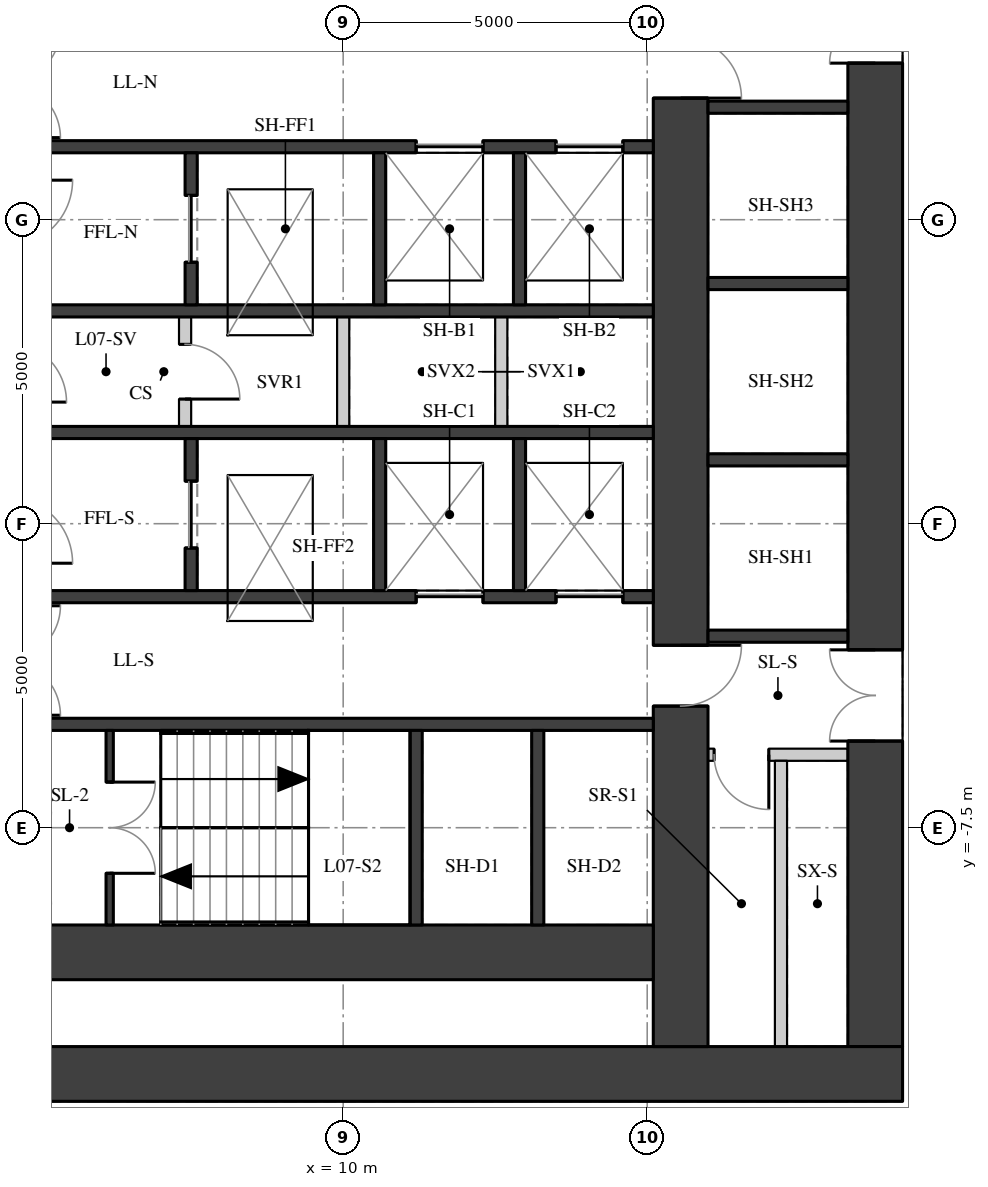
"""IFC4 building model, lengths in metres.
Left out: names, types, materials, properties, quantities, classifications, styles, units other than length and angle.
Written with IfcOpenShell. Run it as: python <this file> out.ifc"""

import sys

from ifc_helpers import new_model, si_unit, direction, frame, frame_2d, origin, place, context, subcontext, project, spatial, rectangle, extrude, element, fill, save


model = new_model("IFC4")
c1 = context("Model", 3, precision=1e-05, world=origin(), true_north=direction((0.0, 1.0)))
c2 = subcontext(c1, "Body", "Model", "MODEL_VIEW")
j1 = project(units=[si_unit("LENGTHUNIT", "METRE"), si_unit("PLANEANGLEUNIT", "RADIAN")], contexts=[c1])
p1 = place(None, origin())
s1 = spatial("IfcSite", under=j1, at=p1, CompositionType="ELEMENT")
p2 = place(p1, origin())
s2 = spatial("IfcBuilding", under=s1, at=p2, CompositionType="ELEMENT")
p3 = place(p2, frame((0.0, 0.0, 31.6)))
s3 = spatial("IfcBuildingStorey", under=s2, at=p3, CompositionType="ELEMENT", Elevation=31.6)
p4 = place(p3, frame((18.75, -11.1, 0.0), z_axis=(0.0, 0.0, 1.0), x_axis=(0.0, 1.0, 0.0)))
e1 = element("IfcWall", 1, at=p4, inside=s3, PredefinedType="SHEAR", context=c2, shape_type="SweptSolid", body=[
    extrude(rectangle(XDim=22.2, YDim=0.9, at=frame_2d((11.1, 0.0))), origin(), (0.0, 0.0, 1.0), 3.02),
])
p5 = place(p4, frame((16.175, 0.0, 0.0)))
e2 = element("IfcOpeningElement", 2, at=p5, cuts=e1, PredefinedType="OPENING", context=c2, shape_type="SweptSolid", body=[
    extrude(rectangle(XDim=1.5, YDim=2.1, at=frame_2d((0.75, 1.05))), frame((0.0, 0.46, 0.0), z_axis=(0.0, -1.0, 0.0), x_axis=(1.0, 0.0, 0.0)), (0.0, 0.0, 1.0), 0.92),
])
p6 = place(p4, frame((5.025, 0.0, 0.0)))
e3 = element("IfcOpeningElement", 3, at=p6, cuts=e1, PredefinedType="OPENING", context=c2, shape_type="SweptSolid", body=[
    extrude(rectangle(XDim=1.5, YDim=2.1, at=frame_2d((0.75, 1.05))), frame((0.0, 0.46, 0.0), z_axis=(0.0, -1.0, 0.0), x_axis=(1.0, 0.0, 0.0)), (0.0, 0.0, 1.0), 0.92),
])
p7 = place(p3, frame((4.0, -11.55, 0.0), z_axis=(0.0, 0.0, 1.0), x_axis=(1.0, 0.0, 0.0)))
e4 = element("IfcWall", 4, at=p7, inside=s3, PredefinedType="SHEAR", context=c2, shape_type="SweptSolid", body=[
    extrude(rectangle(XDim=15.2, YDim=0.9, at=frame_2d((7.6, 0.0))), origin(), (0.0, 0.0, 1.0), 3.02),
])
p8 = place(p3, frame((15.55, -11.1, 0.0), z_axis=(0.0, 0.0, 1.0), x_axis=(0.0, 1.0, 0.0)))
e5 = element("IfcWall", 5, at=p8, inside=s3, PredefinedType="SHEAR", context=c2, shape_type="SweptSolid", body=[
    extrude(rectangle(XDim=22.2, YDim=0.9, at=frame_2d((11.1, 0.0))), origin(), (0.0, 0.0, 1.0), 3.02),
])
p9 = place(p8, frame((15.6, 0.0, 0.0)))
e6 = element("IfcOpeningElement", 6, at=p9, cuts=e5, PredefinedType="OPENING", context=c2, shape_type="SweptSolid", body=[
    extrude(rectangle(XDim=1.0, YDim=2.1, at=frame_2d((0.5, 1.05))), frame((0.0, 0.46, 0.0), z_axis=(0.0, -1.0, 0.0), x_axis=(1.0, 0.0, 0.0)), (0.0, 0.0, 1.0), 0.92),
])
p10 = place(p8, frame((5.6, 0.0, 0.0)))
e7 = element("IfcOpeningElement", 7, at=p10, cuts=e5, PredefinedType="OPENING", context=c2, shape_type="SweptSolid", body=[
    extrude(rectangle(XDim=1.0, YDim=2.1, at=frame_2d((0.5, 1.05))), frame((0.0, 0.46, 0.0), z_axis=(0.0, -1.0, 0.0), x_axis=(1.0, 0.0, 0.0)), (0.0, 0.0, 1.0), 0.92),
])
p11 = place(p3, frame((4.9, -9.55, 0.0), z_axis=(0.0, 0.0, 1.0), x_axis=(1.0, 0.0, 0.0)))
e8 = element("IfcWall", 8, at=p11, inside=s3, PredefinedType="SHEAR", context=c2, shape_type="SweptSolid", body=[
    extrude(rectangle(XDim=10.2, YDim=0.9, at=frame_2d((5.1, 0.0))), origin(), (0.0, 0.0, 1.0), 3.02),
])
p12 = place(p3, frame((4.9, 3.7, 0.0), z_axis=(0.0, 0.0, 1.0), x_axis=(1.0, 0.0, 0.0)))
e9 = element("IfcWall", 9, at=p12, inside=s3, PredefinedType="SHEAR", context=c2, shape_type="SweptSolid", body=[
    extrude(rectangle(XDim=10.2, YDim=0.2, at=frame_2d((5.1, 0.0))), origin(), (0.0, 0.0, 1.0), 3.02),
])
p13 = place(p12, frame((6.3, 0.0, 0.0)))
e10 = element("IfcOpeningElement", 10, at=p13, cuts=e9, PredefinedType="OPENING", context=c2, shape_type="SweptSolid", body=[
    extrude(rectangle(XDim=1.1, YDim=2.1, at=frame_2d((0.55, 1.05))), frame((0.0, 0.11, 0.0), z_axis=(0.0, -1.0, 0.0), x_axis=(1.0, 0.0, 0.0)), (0.0, 0.0, 1.0), 0.22),
])
p14 = place(p12, frame((8.6, 0.0, 0.0)))
e11 = element("IfcOpeningElement", 11, at=p14, cuts=e9, PredefinedType="OPENING", context=c2, shape_type="SweptSolid", body=[
    extrude(rectangle(XDim=1.1, YDim=2.1, at=frame_2d((0.55, 1.05))), frame((0.0, 0.11, 0.0), z_axis=(0.0, -1.0, 0.0), x_axis=(1.0, 0.0, 0.0)), (0.0, 0.0, 1.0), 0.22),
])
for number, where, z_axis, x_axis in (
    (12, (4.9, 1.0, 0.0), (0.0, 0.0, 1.0), (1.0, 0.0, 0.0)),
    (13, (4.9, -1.0, 0.0), (0.0, 0.0, 1.0), (1.0, 0.0, 0.0)),
):
    element("IfcWall", number, at=place(p3, frame(where, z_axis=z_axis, x_axis=x_axis)), inside=s3, PredefinedType="SHEAR", context=c2, shape_type="SweptSolid", body=[
        extrude(rectangle(XDim=10.2, YDim=0.2, at=frame_2d((5.1, 0.0))), origin(), (0.0, 0.0, 1.0), 3.02),
    ])
p15 = place(p3, frame((4.9, -3.7, 0.0), z_axis=(0.0, 0.0, 1.0), x_axis=(1.0, 0.0, 0.0)))
e14 = element("IfcWall", 14, at=p15, inside=s3, PredefinedType="SHEAR", context=c2, shape_type="SweptSolid", body=[
    extrude(rectangle(XDim=10.2, YDim=0.2, at=frame_2d((5.1, 0.0))), origin(), (0.0, 0.0, 1.0), 3.02),
])
p16 = place(p15, frame((6.3, 0.0, 0.0)))
e15 = element("IfcOpeningElement", 15, at=p16, cuts=e14, PredefinedType="OPENING", context=c2, shape_type="SweptSolid", body=[
    extrude(rectangle(XDim=1.1, YDim=2.1, at=frame_2d((0.55, 1.05))), frame((0.0, 0.11, 0.0), z_axis=(0.0, -1.0, 0.0), x_axis=(1.0, 0.0, 0.0)), (0.0, 0.0, 1.0), 0.22),
])
p17 = place(p15, frame((8.6, 0.0, 0.0)))
e16 = element("IfcOpeningElement", 16, at=p17, cuts=e14, PredefinedType="OPENING", context=c2, shape_type="SweptSolid", body=[
    extrude(rectangle(XDim=1.1, YDim=2.1, at=frame_2d((0.55, 1.05))), frame((0.0, 0.11, 0.0), z_axis=(0.0, -1.0, 0.0), x_axis=(1.0, 0.0, 0.0)), (0.0, 0.0, 1.0), 0.22),
])
p18 = place(p3, frame((4.9, -5.8, 0.0), z_axis=(0.0, 0.0, 1.0), x_axis=(1.0, 0.0, 0.0)))
e17 = element("IfcWall", 17, at=p18, inside=s3, PredefinedType="SHEAR", context=c2, shape_type="SweptSolid", body=[
    extrude(rectangle(XDim=10.2, YDim=0.2, at=frame_2d((5.1, 0.0))), origin(), (0.0, 0.0, 1.0), 3.02),
])
for number, where, z_axis, x_axis in (
    (18, (11.2, -9.1, 0.0), (0.0, 0.0, 1.0), (0.0, 1.0, 0.0)),
    (19, (13.2, -9.1, 0.0), (0.0, 0.0, 1.0), (0.0, 1.0, 0.0)),
):
    element("IfcWall", number, at=place(p3, frame(where, z_axis=z_axis, x_axis=x_axis)), inside=s3, PredefinedType="SHEAR", context=c2, shape_type="SweptSolid", body=[
        extrude(rectangle(XDim=3.2, YDim=0.2, at=frame_2d((1.6, 0.0))), origin(), (0.0, 0.0, 1.0), 3.02),
    ])
p19 = place(p3, frame((7.5, 1.1, 0.0), z_axis=(0.0, 0.0, 1.0), x_axis=(0.0, 1.0, 0.0)))
e20 = element("IfcWall", 20, at=p19, inside=s3, PredefinedType="SHEAR", context=c2, shape_type="SweptSolid", body=[
    extrude(rectangle(XDim=2.5, YDim=0.2, at=frame_2d((1.25, 0.0))), origin(), (0.0, 0.0, 1.0), 3.02),
])
p20 = place(p19, frame((0.7, 0.0, 0.0)))
e21 = element("IfcOpeningElement", 21, at=p20, cuts=e20, PredefinedType="OPENING", context=c2, shape_type="SweptSolid", body=[
    extrude(rectangle(XDim=1.1, YDim=2.1, at=frame_2d((0.55, 1.05))), frame((0.0, 0.11, 0.0), z_axis=(0.0, -1.0, 0.0), x_axis=(1.0, 0.0, 0.0)), (0.0, 0.0, 1.0), 0.22),
])
p21 = place(p3, frame((7.5, -3.6, 0.0), z_axis=(0.0, 0.0, 1.0), x_axis=(0.0, 1.0, 0.0)))
e22 = element("IfcWall", 22, at=p21, inside=s3, PredefinedType="SHEAR", context=c2, shape_type="SweptSolid", body=[
    extrude(rectangle(XDim=2.5, YDim=0.2, at=frame_2d((1.25, 0.0))), origin(), (0.0, 0.0, 1.0), 3.02),
])
p22 = place(p21, frame((0.7, 0.0, 0.0)))
e23 = element("IfcOpeningElement", 23, at=p22, cuts=e22, PredefinedType="OPENING", context=c2, shape_type="SweptSolid", body=[
    extrude(rectangle(XDim=1.1, YDim=2.1, at=frame_2d((0.55, 1.05))), frame((0.0, 0.11, 0.0), z_axis=(0.0, -1.0, 0.0), x_axis=(1.0, 0.0, 0.0)), (0.0, 0.0, 1.0), 0.22),
])
for number, where, z_axis, x_axis in (
    (24, (10.6, 1.1, 0.0), (0.0, 0.0, 1.0), (0.0, 1.0, 0.0)),
    (25, (10.6, -3.6, 0.0), (0.0, 0.0, 1.0), (0.0, 1.0, 0.0)),
    (26, (12.9, 1.1, 0.0), (0.0, 0.0, 1.0), (0.0, 1.0, 0.0)),
    (27, (12.9, -3.6, 0.0), (0.0, 0.0, 1.0), (0.0, 1.0, 0.0)),
):
    element("IfcWall", number, at=place(p3, frame(where, z_axis=z_axis, x_axis=x_axis)), inside=s3, PredefinedType="SHEAR", context=c2, shape_type="SweptSolid", body=[
        extrude(rectangle(XDim=2.5, YDim=0.2, at=frame_2d((1.25, 0.0))), origin(), (0.0, 0.0, 1.0), 3.02),
    ])
p23 = place(p3, frame((6.16, -9.1, 0.0), z_axis=(0.0, 0.0, 1.0), x_axis=(0.0, 1.0, 0.0)))
e28 = element("IfcWall", 28, at=p23, inside=s3, PredefinedType="SHEAR", context=c2, shape_type="SweptSolid", body=[
    extrude(rectangle(XDim=3.2, YDim=0.12, at=frame_2d((1.6, 0.0))), origin(), (0.0, 0.0, 1.0), 3.02),
])
p24 = place(p23, frame((0.85, 0.0, 0.0)))
e29 = element("IfcOpeningElement", 29, at=p24, cuts=e28, PredefinedType="OPENING", context=c2, shape_type="SweptSolid", body=[
    extrude(rectangle(XDim=1.5, YDim=2.1, at=frame_2d((0.75, 1.05))), frame((0.0, 0.07, 0.0), z_axis=(0.0, -1.0, 0.0), x_axis=(1.0, 0.0, 0.0)), (0.0, 0.0, 1.0), 0.14),
])
p25 = place(p3, frame((7.4, -0.9, 0.0), z_axis=(0.0, 0.0, 1.0), x_axis=(0.0, 1.0, 0.0)))
e30 = element("IfcWall", 30, at=p25, inside=s3, PredefinedType="PARTITIONING", context=c2, shape_type="SweptSolid", body=[
    extrude(rectangle(XDim=1.8, YDim=0.2, at=frame_2d((0.9, 0.0))), origin(), (0.0, 0.0, 1.0), 3.02),
])
p26 = place(p25, frame((0.45, 0.0, 0.0)))
e31 = element("IfcOpeningElement", 31, at=p26, cuts=e30, PredefinedType="OPENING", context=c2, shape_type="SweptSolid", body=[
    extrude(rectangle(XDim=0.9, YDim=2.1, at=frame_2d((0.45, 1.05))), frame((0.0, 0.11, 0.0), z_axis=(0.0, -1.0, 0.0), x_axis=(1.0, 0.0, 0.0)), (0.0, 0.0, 1.0), 0.22),
])
for number, where, z_axis, x_axis in (
    (32, (10.0, -0.9, 0.0), (0.0, 0.0, 1.0), (0.0, 1.0, 0.0)),
    (33, (12.6, -0.9, 0.0), (0.0, 0.0, 1.0), (0.0, 1.0, 0.0)),
):
    element("IfcWall", number, at=place(p3, frame(where, z_axis=z_axis, x_axis=x_axis)), inside=s3, PredefinedType="PARTITIONING", context=c2, shape_type="SweptSolid", body=[
        extrude(rectangle(XDim=1.8, YDim=0.2, at=frame_2d((0.9, 0.0))), origin(), (0.0, 0.0, 1.0), 3.02),
    ])
for number, where, z_axis, x_axis in (
    (34, (16.0, -4.35, 0.0), (0.0, 0.0, 1.0), (1.0, 0.0, 0.0)),
    (35, (16.0, -1.45, 0.0), (0.0, 0.0, 1.0), (1.0, 0.0, 0.0)),
    (36, (16.0, 1.45, 0.0), (0.0, 0.0, 1.0), (1.0, 0.0, 0.0)),
    (37, (16.0, 4.35, 0.0), (0.0, 0.0, 1.0), (1.0, 0.0, 0.0)),
):
    element("IfcWall", number, at=place(p3, frame(where, z_axis=z_axis, x_axis=x_axis)), inside=s3, PredefinedType="SHEAR", context=c2, shape_type="SweptSolid", body=[
        extrude(rectangle(XDim=2.3, YDim=0.2, at=frame_2d((1.15, 0.0))), origin(), (0.0, 0.0, 1.0), 3.02),
    ])
p27 = place(p3, frame((16.0, -6.3, 0.0), z_axis=(0.0, 0.0, 1.0), x_axis=(1.0, 0.0, 0.0)))
e38 = element("IfcWall", 38, at=p27, inside=s3, PredefinedType="PARTITIONING", context=c2, shape_type="SweptSolid", body=[
    extrude(rectangle(XDim=2.3, YDim=0.2, at=frame_2d((1.15, 0.0))), origin(), (0.0, 0.0, 1.0), 3.02),
])
p28 = place(p27, frame((0.1, 0.0, 0.0)))
e39 = element("IfcOpeningElement", 39, at=p28, cuts=e38, PredefinedType="OPENING", context=c2, shape_type="SweptSolid", body=[
    extrude(rectangle(XDim=0.9, YDim=2.1, at=frame_2d((0.45, 1.05))), frame((0.0, 0.11, 0.0), z_axis=(0.0, -1.0, 0.0), x_axis=(1.0, 0.0, 0.0)), (0.0, 0.0, 1.0), 0.22),
])
p29 = place(p3, frame((17.2, -11.1, 0.0), z_axis=(0.0, 0.0, 1.0), x_axis=(0.0, 1.0, 0.0)))
e40 = element("IfcWall", 40, at=p29, inside=s3, PredefinedType="PARTITIONING", context=c2, shape_type="SweptSolid", body=[
    extrude(rectangle(XDim=4.7, YDim=0.2, at=frame_2d((2.35, 0.0))), origin(), (0.0, 0.0, 1.0), 3.02),
])
p30 = place(p5, origin())
e41 = element("IfcDoor", 41, at=p30, inside=s3, OperationType="DOUBLE_DOOR_SINGLE_SWING", PredefinedType="DOOR", context=c2, shape_type="SweptSolid", body=[
    extrude(rectangle(XDim=1.5, YDim=2.1, at=frame_2d((0.75, 1.05))), frame((0.0, 0.025, 0.0), z_axis=(0.0, -1.0, 0.0), x_axis=(1.0, 0.0, 0.0)), (0.0, 0.0, 1.0), 0.05),
])
fill(e2, e41)
p31 = place(p6, origin())
e42 = element("IfcDoor", 42, at=p31, inside=s3, OperationType="DOUBLE_DOOR_SINGLE_SWING", PredefinedType="DOOR", context=c2, shape_type="SweptSolid", body=[
    extrude(rectangle(XDim=1.5, YDim=2.1, at=frame_2d((0.75, 1.05))), frame((0.0, 0.025, 0.0), z_axis=(0.0, -1.0, 0.0), x_axis=(1.0, 0.0, 0.0)), (0.0, 0.0, 1.0), 0.05),
])
fill(e3, e42)
p32 = place(p24, origin())
e43 = element("IfcDoor", 43, at=p32, inside=s3, OperationType="DOUBLE_DOOR_SINGLE_SWING", PredefinedType="DOOR", context=c2, shape_type="SweptSolid", body=[
    extrude(rectangle(XDim=1.5, YDim=2.1, at=frame_2d((0.75, 1.05))), frame((0.0, 0.025, 0.0), z_axis=(0.0, -1.0, 0.0), x_axis=(1.0, 0.0, 0.0)), (0.0, 0.0, 1.0), 0.05),
])
fill(e29, e43)
p33 = place(p13, origin())
e44 = element("IfcDoor", 44, at=p33, inside=s3, OperationType="DOUBLE_DOOR_SLIDING", PredefinedType="DOOR", context=c2, shape_type="SweptSolid", body=[
    extrude(rectangle(XDim=1.1, YDim=2.1, at=frame_2d((0.55, 1.05))), frame((0.0, 0.025, 0.0), z_axis=(0.0, -1.0, 0.0), x_axis=(1.0, 0.0, 0.0)), (0.0, 0.0, 1.0), 0.05),
])
fill(e10, e44)
p34 = place(p14, origin())
e45 = element("IfcDoor", 45, at=p34, inside=s3, OperationType="DOUBLE_DOOR_SLIDING", PredefinedType="DOOR", context=c2, shape_type="SweptSolid", body=[
    extrude(rectangle(XDim=1.1, YDim=2.1, at=frame_2d((0.55, 1.05))), frame((0.0, 0.025, 0.0), z_axis=(0.0, -1.0, 0.0), x_axis=(1.0, 0.0, 0.0)), (0.0, 0.0, 1.0), 0.05),
])
fill(e11, e45)
p35 = place(p16, origin())
e46 = element("IfcDoor", 46, at=p35, inside=s3, OperationType="DOUBLE_DOOR_SLIDING", PredefinedType="DOOR", context=c2, shape_type="SweptSolid", body=[
    extrude(rectangle(XDim=1.1, YDim=2.1, at=frame_2d((0.55, 1.05))), frame((0.0, 0.025, 0.0), z_axis=(0.0, -1.0, 0.0), x_axis=(1.0, 0.0, 0.0)), (0.0, 0.0, 1.0), 0.05),
])
fill(e15, e46)
p36 = place(p17, origin())
e47 = element("IfcDoor", 47, at=p36, inside=s3, OperationType="DOUBLE_DOOR_SLIDING", PredefinedType="DOOR", context=c2, shape_type="SweptSolid", body=[
    extrude(rectangle(XDim=1.1, YDim=2.1, at=frame_2d((0.55, 1.05))), frame((0.0, 0.025, 0.0), z_axis=(0.0, -1.0, 0.0), x_axis=(1.0, 0.0, 0.0)), (0.0, 0.0, 1.0), 0.05),
])
fill(e16, e47)
p37 = place(p20, origin())
e48 = element("IfcDoor", 48, at=p37, inside=s3, OperationType="DOUBLE_DOOR_SLIDING", PredefinedType="DOOR", context=c2, shape_type="SweptSolid", body=[
    extrude(rectangle(XDim=1.1, YDim=2.1, at=frame_2d((0.55, 1.05))), frame((0.0, 0.025, 0.0), z_axis=(0.0, -1.0, 0.0), x_axis=(1.0, 0.0, 0.0)), (0.0, 0.0, 1.0), 0.05),
])
fill(e21, e48)
p38 = place(p22, origin())
e49 = element("IfcDoor", 49, at=p38, inside=s3, OperationType="DOUBLE_DOOR_SLIDING", PredefinedType="DOOR", context=c2, shape_type="SweptSolid", body=[
    extrude(rectangle(XDim=1.1, YDim=2.1, at=frame_2d((0.55, 1.05))), frame((0.0, 0.025, 0.0), z_axis=(0.0, -1.0, 0.0), x_axis=(1.0, 0.0, 0.0)), (0.0, 0.0, 1.0), 0.05),
])
fill(e23, e49)
p39 = place(p26, origin())
e50 = element("IfcDoor", 50, at=p39, inside=s3, OperationType="SINGLE_SWING_RIGHT", PredefinedType="DOOR", context=c2, shape_type="SweptSolid", body=[
    extrude(rectangle(XDim=0.9, YDim=2.1, at=frame_2d((0.45, 1.05))), frame((0.0, 0.025, 0.0), z_axis=(0.0, -1.0, 0.0), x_axis=(1.0, 0.0, 0.0)), (0.0, 0.0, 1.0), 0.05),
])
fill(e31, e50)
p40 = place(p9, origin())
e51 = element("IfcDoor", 51, at=p40, inside=s3, OperationType="SINGLE_SWING_RIGHT", PredefinedType="DOOR", context=c2, shape_type="SweptSolid", body=[
    extrude(rectangle(XDim=1.0, YDim=2.1, at=frame_2d((0.5, 1.05))), frame((0.0, 0.025, 0.0), z_axis=(0.0, -1.0, 0.0), x_axis=(1.0, 0.0, 0.0)), (0.0, 0.0, 1.0), 0.05),
])
fill(e6, e51)
p41 = place(p10, origin())
e52 = element("IfcDoor", 52, at=p41, inside=s3, OperationType="SINGLE_SWING_LEFT", PredefinedType="DOOR", context=c2, shape_type="SweptSolid", body=[
    extrude(rectangle(XDim=1.0, YDim=2.1, at=frame_2d((0.5, 1.05))), frame((0.0, 0.025, 0.0), z_axis=(0.0, -1.0, 0.0), x_axis=(1.0, 0.0, 0.0)), (0.0, 0.0, 1.0), 0.05),
])
fill(e7, e52)
p42 = place(p28, origin())
e53 = element("IfcDoor", 53, at=p42, inside=s3, OperationType="SINGLE_SWING_LEFT", PredefinedType="DOOR", context=c2, shape_type="SweptSolid", body=[
    extrude(rectangle(XDim=0.9, YDim=2.1, at=frame_2d((0.45, 1.05))), frame((0.0, 0.025, 0.0), z_axis=(0.0, -1.0, 0.0), x_axis=(1.0, 0.0, 0.0)), (0.0, 0.0, 1.0), 0.05),
])
fill(e39, e53)
save(model, sys.argv[1])
